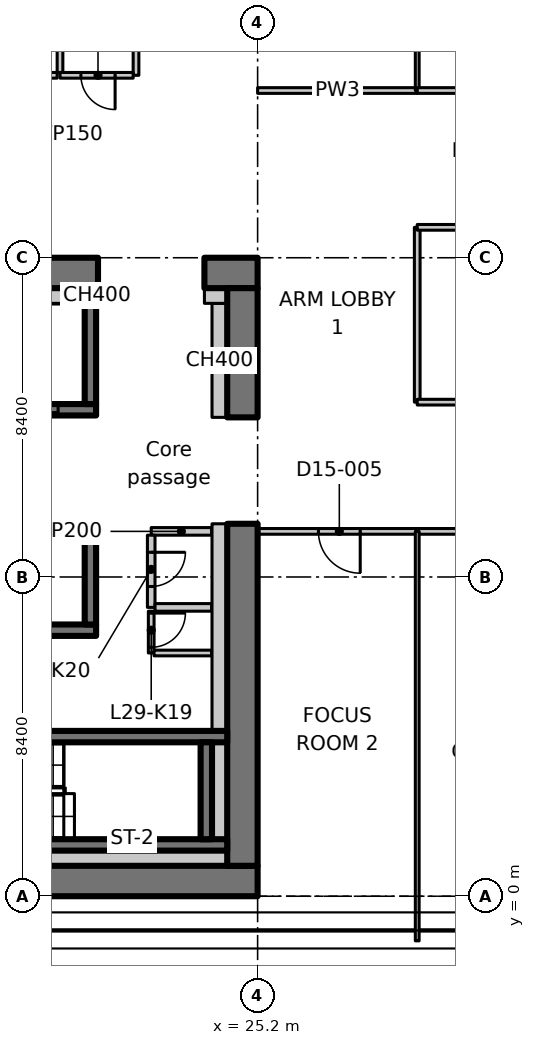
"""IFC4 building model, lengths in metres.
Left out: names, types, materials, properties, quantities, classifications, styles, units other than length and angle.
Written with IfcOpenShell. Run it as: python <this file> out.ifc"""

import sys

from ifc_helpers import new_model, si_unit, direction, frame, frame_2d, origin, place, context, subcontext, project, spatial, polyline, rectangle, outline, extrude, element, fill, save


model = new_model("IFC4")
c1 = context("Model", 3, precision=1e-05, world=origin(), true_north=direction((0.0, 1.0)))
c2 = subcontext(c1, "Body", "Model", "MODEL_VIEW")
j1 = project(units=[si_unit("LENGTHUNIT", "METRE"), si_unit("PLANEANGLEUNIT", "RADIAN")], contexts=[c1])
p1 = place(None, origin())
s1 = spatial("IfcSite", under=j1, at=p1, CompositionType="ELEMENT")
p2 = place(p1, origin())
s2 = spatial("IfcBuilding", under=s1, at=p2, CompositionType="ELEMENT")
p3 = place(p2, frame((0.0, 0.0, 120.5)))
s3 = spatial("IfcBuildingStorey", under=s2, at=p3, CompositionType="ELEMENT", Elevation=120.5)
p4 = place(p3, frame((7.136, 0.4, 0.0), z_axis=(0.0, 0.0, 1.0), x_axis=(1.0, 0.0, 0.0)))
e1 = element("IfcWall", 1, at=p4, inside=s3, PredefinedType="SHEAR", context=c2, shape_type="SweptSolid", body=[
    extrude(rectangle(XDim=18.063, YDim=0.8, at=frame_2d((9.032, 0.0))), origin(), (0.0, 0.0, 1.0), 3.35),
])
p5 = place(p3, frame((-1.1, 16.4, 0.0), z_axis=(0.0, 0.0, 1.0), x_axis=(1.0, 0.0, 0.0)))
e2 = element("IfcWall", 2, at=p5, inside=s3, PredefinedType="SHEAR", context=c2, shape_type="SweptSolid", body=[
    extrude(rectangle(XDim=22.1, YDim=0.8, at=frame_2d((11.05, 0.0))), origin(), (0.0, 0.0, 1.0), 3.35),
])
p6 = place(p5, frame((3.15, 0.0, 0.0)))
e3 = element("IfcOpeningElement", 3, at=p6, cuts=e2, PredefinedType="OPENING", context=c2, shape_type="SweptSolid", body=[
    extrude(rectangle(XDim=1.1, YDim=2.3, at=frame_2d((0.55, 1.15))), frame((0.0, 0.41, 0.0), z_axis=(0.0, -1.0, 0.0), x_axis=(1.0, 0.0, 0.0)), (0.0, 0.0, 1.0), 0.82),
])
p7 = place(p3, frame((23.8, 16.4, 0.0), z_axis=(0.0, 0.0, 1.0), x_axis=(1.0, 0.0, 0.0)))
e4 = element("IfcWall", 4, at=p7, inside=s3, PredefinedType="SHEAR", context=c2, shape_type="SweptSolid", body=[
    extrude(rectangle(XDim=1.4, YDim=0.8, at=frame_2d((0.7, 0.0))), origin(), (0.0, 0.0, 1.0), 3.35),
])
p8 = place(p3, frame((24.8, 0.8, 0.0), z_axis=(0.0, 0.0, 1.0), x_axis=(0.0, 1.0, 0.0)))
e5 = element("IfcWall", 5, at=p8, inside=s3, PredefinedType="SHEAR", context=c2, shape_type="SweptSolid", body=[
    extrude(rectangle(XDim=9.0, YDim=0.8, at=frame_2d((4.5, 0.0))), origin(), (0.0, 0.0, 1.0), 3.35),
])
p9 = place(p3, frame((24.8, 12.6, 0.0), z_axis=(0.0, 0.0, 1.0), x_axis=(0.0, 1.0, 0.0)))
e6 = element("IfcWall", 6, at=p9, inside=s3, PredefinedType="SHEAR", context=c2, shape_type="SweptSolid", body=[
    extrude(rectangle(XDim=3.4, YDim=0.8, at=frame_2d((1.7, 0.0))), origin(), (0.0, 0.0, 1.0), 3.35),
])
p10 = place(p3, frame((24.2, 12.6, 0.0), z_axis=(0.0, 0.0, 1.0), x_axis=(0.0, 1.0, 0.0)))
e7 = element("IfcWall", 7, at=p10, inside=s3, PredefinedType="PARTITIONING", context=c2, shape_type="SweptSolid", body=[
    extrude(rectangle(XDim=3.0, YDim=0.4, at=frame_2d((1.5, 0.0))), origin(), (0.0, 0.0, 1.0), 3.35),
])
p11 = place(p3, frame((23.8, 15.8, 0.0), z_axis=(0.0, 0.0, 1.0), x_axis=(1.0, 0.0, 0.0)))
e8 = element("IfcWall", 8, at=p11, inside=s3, PredefinedType="PARTITIONING", context=c2, shape_type="SweptSolid", body=[
    extrude(rectangle(XDim=0.6, YDim=0.4, at=frame_2d((0.3, 0.0))), origin(), (0.0, 0.0, 1.0), 3.35),
])
p12 = place(p3, frame((0.8, 7.0, 0.0), z_axis=(0.0, 0.0, 1.0), x_axis=(1.0, 0.0, 0.0)))
e9 = element("IfcWall", 9, at=p12, inside=s3, PredefinedType="SHEAR", context=c2, shape_type="SweptSolid", body=[
    extrude(rectangle(XDim=20.15, YDim=0.3, at=frame_2d((10.075, 0.0))), origin(), (0.0, 0.0, 1.0), 3.35),
])
p13 = place(p3, frame((0.8, 9.6, 0.0), z_axis=(0.0, 0.0, 1.0), x_axis=(1.0, 0.0, 0.0)))
e10 = element("IfcWall", 10, at=p13, inside=s3, PredefinedType="SHEAR", context=c2, shape_type="SweptSolid", body=[
    extrude(rectangle(XDim=20.15, YDim=0.3, at=frame_2d((10.075, 0.0))), origin(), (0.0, 0.0, 1.0), 3.35),
])
p14 = place(p13, frame((1.25, 0.0, 0.0)))
e11 = element("IfcOpeningElement", 11, at=p14, cuts=e10, PredefinedType="OPENING", context=c2, shape_type="SweptSolid", body=[
    extrude(rectangle(XDim=1.1, YDim=2.3, at=frame_2d((0.55, 1.15))), frame((0.0, 0.16, 0.0), z_axis=(0.0, -1.0, 0.0), x_axis=(1.0, 0.0, 0.0)), (0.0, 0.0, 1.0), 0.32),
])
p15 = place(p13, frame((4.05, 0.0, 0.0)))
e12 = element("IfcOpeningElement", 12, at=p15, cuts=e10, PredefinedType="OPENING", context=c2, shape_type="SweptSolid", body=[
    extrude(rectangle(XDim=1.1, YDim=2.3, at=frame_2d((0.55, 1.15))), frame((0.0, 0.16, 0.0), z_axis=(0.0, -1.0, 0.0), x_axis=(1.0, 0.0, 0.0)), (0.0, 0.0, 1.0), 0.32),
])
p16 = place(p13, frame((6.85, 0.0, 0.0)))
e13 = element("IfcOpeningElement", 13, at=p16, cuts=e10, PredefinedType="OPENING", context=c2, shape_type="SweptSolid", body=[
    extrude(rectangle(XDim=1.1, YDim=2.3, at=frame_2d((0.55, 1.15))), frame((0.0, 0.16, 0.0), z_axis=(0.0, -1.0, 0.0), x_axis=(1.0, 0.0, 0.0)), (0.0, 0.0, 1.0), 0.32),
])
p17 = place(p13, frame((9.65, 0.0, 0.0)))
e14 = element("IfcOpeningElement", 14, at=p17, cuts=e10, PredefinedType="OPENING", context=c2, shape_type="SweptSolid", body=[
    extrude(rectangle(XDim=1.1, YDim=2.3, at=frame_2d((0.55, 1.15))), frame((0.0, 0.16, 0.0), z_axis=(0.0, -1.0, 0.0), x_axis=(1.0, 0.0, 0.0)), (0.0, 0.0, 1.0), 0.32),
])
p18 = place(p13, frame((12.45, 0.0, 0.0)))
e15 = element("IfcOpeningElement", 15, at=p18, cuts=e10, PredefinedType="OPENING", context=c2, shape_type="SweptSolid", body=[
    extrude(rectangle(XDim=1.1, YDim=2.3, at=frame_2d((0.55, 1.15))), frame((0.0, 0.16, 0.0), z_axis=(0.0, -1.0, 0.0), x_axis=(1.0, 0.0, 0.0)), (0.0, 0.0, 1.0), 0.32),
])
p19 = place(p13, frame((15.25, 0.0, 0.0)))
e16 = element("IfcOpeningElement", 16, at=p19, cuts=e10, PredefinedType="OPENING", context=c2, shape_type="SweptSolid", body=[
    extrude(rectangle(XDim=1.1, YDim=2.3, at=frame_2d((0.55, 1.15))), frame((0.0, 0.16, 0.0), z_axis=(0.0, -1.0, 0.0), x_axis=(1.0, 0.0, 0.0)), (0.0, 0.0, 1.0), 0.32),
])
p20 = place(p3, frame((20.8, 7.15, 0.0), z_axis=(0.0, 0.0, 1.0), x_axis=(0.0, 1.0, 0.0)))
e17 = element("IfcWall", 17, at=p20, inside=s3, PredefinedType="SHEAR", context=c2, shape_type="SweptSolid", body=[
    extrude(rectangle(XDim=2.3, YDim=0.3, at=frame_2d((1.15, 0.0))), origin(), (0.0, 0.0, 1.0), 3.35),
])
p21 = place(p3, frame((15.05, 12.8, 0.0), z_axis=(0.0, 0.0, 1.0), x_axis=(1.0, 0.0, 0.0)))
e18 = element("IfcWall", 18, at=p21, inside=s3, PredefinedType="SHEAR", context=c2, shape_type="SweptSolid", body=[
    extrude(rectangle(XDim=5.9, YDim=0.3, at=frame_2d((2.95, 0.0))), origin(), (0.0, 0.0, 1.0), 3.35),
])
p22 = place(p21, frame((3.8, 0.0, 0.0)))
e19 = element("IfcOpeningElement", 19, at=p22, cuts=e18, PredefinedType="OPENING", context=c2, shape_type="SweptSolid", body=[
    extrude(rectangle(XDim=1.1, YDim=2.3, at=frame_2d((0.55, 1.15))), frame((0.0, 0.16, 0.0), z_axis=(0.0, -1.0, 0.0), x_axis=(1.0, 0.0, 0.0)), (0.0, 0.0, 1.0), 0.32),
])
p23 = place(p3, frame((20.8, 12.95, 0.0), z_axis=(0.0, 0.0, 1.0), x_axis=(0.0, 1.0, 0.0)))
e20 = element("IfcWall", 20, at=p23, inside=s3, PredefinedType="SHEAR", context=c2, shape_type="SweptSolid", body=[
    extrude(rectangle(XDim=3.05, YDim=0.3, at=frame_2d((1.525, 0.0))), origin(), (0.0, 0.0, 1.0), 3.35),
])
p24 = place(p3, frame((15.8, 1.35, 0.0), z_axis=(0.0, 0.0, 1.0), x_axis=(1.0, 0.0, 0.0)))
e21 = element("IfcWall", 21, at=p24, inside=s3, PredefinedType="SHEAR", context=c2, shape_type="SweptSolid", body=[
    extrude(rectangle(XDim=8.6, YDim=0.3, at=frame_2d((4.3, 0.0))), origin(), (0.0, 0.0, 1.0), 3.35),
])
p25 = place(p3, frame((15.8, 4.2, 0.0), z_axis=(0.0, 0.0, 1.0), x_axis=(1.0, 0.0, 0.0)))
e22 = element("IfcWall", 22, at=p25, inside=s3, PredefinedType="SHEAR", context=c2, shape_type="SweptSolid", body=[
    extrude(rectangle(XDim=8.6, YDim=0.3, at=frame_2d((4.3, 0.0))), origin(), (0.0, 0.0, 1.0), 3.35),
])
p26 = place(p25, frame((0.4, 0.0, 0.0)))
e23 = element("IfcOpeningElement", 23, at=p26, cuts=e22, PredefinedType="OPENING", context=c2, shape_type="SweptSolid", body=[
    extrude(rectangle(XDim=1.0, YDim=2.1, at=frame_2d((0.5, 1.05))), frame((0.0, 0.16, 0.0), z_axis=(0.0, -1.0, 0.0), x_axis=(1.0, 0.0, 0.0)), (0.0, 0.0, 1.0), 0.32),
])
p27 = place(p3, frame((23.85, 1.5, 0.0), z_axis=(0.0, 0.0, 1.0), x_axis=(0.0, 1.0, 0.0)))
e24 = element("IfcWall", 24, at=p27, inside=s3, PredefinedType="SHEAR", context=c2, shape_type="SweptSolid", body=[
    extrude(rectangle(XDim=2.55, YDim=0.3, at=frame_2d((1.275, 0.0))), origin(), (0.0, 0.0, 1.0), 3.35),
])
p28 = place(p3, frame((23.988, 9.6, 0.0), z_axis=(0.0, 0.0, 1.0), x_axis=(-1.0, 0.0, 0.0)))
e25 = element("IfcWall", 25, at=p28, inside=s3, PredefinedType="PARTITIONING", context=c2, shape_type="SweptSolid", body=[
    extrude(rectangle(XDim=1.588, YDim=0.2, at=frame_2d((0.794, 0.0))), origin(), (0.0, 0.0, 1.0), 3.35),
])
p29 = place(p3, frame((22.4, 9.5, 0.0), z_axis=(0.0, 0.0, 1.0), x_axis=(0.0, -1.0, 0.0)))
e26 = element("IfcWall", 26, at=p29, inside=s3, PredefinedType="PARTITIONING", context=c2, shape_type="SweptSolid", body=[
    extrude(rectangle(XDim=1.9, YDim=0.2, at=frame_2d((0.95, 0.0))), origin(), (0.0, 0.0, 1.0), 3.35),
])
p30 = place(p29, frame((0.45, 0.0, 0.0)))
e27 = element("IfcOpeningElement", 27, at=p30, cuts=e26, PredefinedType="OPENING", context=c2, shape_type="SweptSolid", body=[
    extrude(rectangle(XDim=0.9, YDim=2.1, at=frame_2d((0.45, 1.05))), frame((0.0, 0.11, 0.0), z_axis=(0.0, -1.0, 0.0), x_axis=(1.0, 0.0, 0.0)), (0.0, 0.0, 1.0), 0.22),
])
p31 = place(p3, frame((22.5, 7.6, 0.0), z_axis=(0.0, 0.0, 1.0), x_axis=(1.0, 0.0, 0.0)))
e28 = element("IfcWall", 28, at=p31, inside=s3, PredefinedType="PARTITIONING", context=c2, shape_type="SweptSolid", body=[
    extrude(rectangle(XDim=1.488, YDim=0.2, at=frame_2d((0.744, 0.0))), origin(), (0.0, 0.0, 1.0), 3.35),
])
p32 = place(p3, frame((22.0, 23.925, 0.0), z_axis=(0.0, 0.0, 1.0), x_axis=(0.0, -1.0, 0.0)))
e29 = element("IfcWall", 29, at=p32, inside=s3, PredefinedType="PARTITIONING", context=c2, shape_type="SweptSolid", body=[
    extrude(rectangle(XDim=2.325, YDim=0.15, at=frame_2d((1.163, 0.0))), origin(), (0.0, 0.0, 1.0), 3.35),
])
p33 = place(p3, frame((21.925, 21.6, 0.0), z_axis=(0.0, 0.0, 1.0), x_axis=(-1.0, 0.0, 0.0)))
e30 = element("IfcWall", 30, at=p33, inside=s3, PredefinedType="PARTITIONING", context=c2, shape_type="SweptSolid", body=[
    extrude(rectangle(XDim=1.925, YDim=0.15, at=frame_2d((0.962, 0.0))), origin(), (0.0, 0.0, 1.0), 3.35),
])
p34 = place(p33, frame((0.475, 0.0, 0.0)))
e31 = element("IfcOpeningElement", 31, at=p34, cuts=e30, PredefinedType="OPENING", context=c2, shape_type="SweptSolid", body=[
    extrude(rectangle(XDim=0.9, YDim=2.1, at=frame_2d((0.45, 1.05))), frame((0.0, 0.085, 0.0), z_axis=(0.0, -1.0, 0.0), x_axis=(1.0, 0.0, 0.0)), (0.0, 0.0, 1.0), 0.17),
])
p35 = place(p3, frame((20.0, 21.675, 0.0), z_axis=(0.0, 0.0, 1.0), x_axis=(0.0, 1.0, 0.0)))
e32 = element("IfcWall", 32, at=p35, inside=s3, PredefinedType="PARTITIONING", context=c2, shape_type="SweptSolid", body=[
    extrude(rectangle(XDim=2.25, YDim=0.15, at=frame_2d((1.125, 0.0))), origin(), (0.0, 0.0, 1.0), 3.35),
])
p36 = place(p3, frame((19.925, 21.6, 0.0), z_axis=(0.0, 0.0, 1.0), x_axis=(-1.0, 0.0, 0.0)))
e33 = element("IfcWall", 33, at=p36, inside=s3, PredefinedType="PARTITIONING", context=c2, shape_type="SweptSolid", body=[
    extrude(rectangle(XDim=2.325, YDim=0.15, at=frame_2d((1.163, 0.0))), origin(), (0.0, 0.0, 1.0), 3.35),
])
p37 = place(p36, frame((0.675, 0.0, 0.0)))
e34 = element("IfcOpeningElement", 34, at=p37, cuts=e33, PredefinedType="OPENING", context=c2, shape_type="SweptSolid", body=[
    extrude(rectangle(XDim=0.9, YDim=2.1, at=frame_2d((0.45, 1.05))), frame((0.0, 0.085, 0.0), z_axis=(0.0, -1.0, 0.0), x_axis=(1.0, 0.0, 0.0)), (0.0, 0.0, 1.0), 0.17),
])
p38 = place(p3, frame((22.4, 7.5, 0.0), z_axis=(0.0, 0.0, 1.0), x_axis=(0.0, -1.0, 0.0)))
e35 = element("IfcWall", 35, at=p38, inside=s3, PredefinedType="PARTITIONING", context=c2, shape_type="SweptSolid", body=[
    extrude(rectangle(XDim=1.1, YDim=0.15, at=frame_2d((0.55, 0.0))), origin(), (0.0, 0.0, 1.0), 3.35),
])
p39 = place(p38, frame((0.05, 0.0, 0.0)))
e36 = element("IfcOpeningElement", 36, at=p39, cuts=e35, PredefinedType="OPENING", context=c2, shape_type="SweptSolid", body=[
    extrude(rectangle(XDim=0.9, YDim=2.1, at=frame_2d((0.45, 1.05))), frame((0.0, 0.085, 0.0), z_axis=(0.0, -1.0, 0.0), x_axis=(1.0, 0.0, 0.0)), (0.0, 0.0, 1.0), 0.17),
])
p40 = place(p3, frame((22.475, 6.4, 0.0), z_axis=(0.0, 0.0, 1.0), x_axis=(1.0, 0.0, 0.0)))
e37 = element("IfcWall", 37, at=p40, inside=s3, PredefinedType="PARTITIONING", context=c2, shape_type="SweptSolid", body=[
    extrude(rectangle(XDim=1.513, YDim=0.15, at=frame_2d((0.756, 0.0))), origin(), (0.0, 0.0, 1.0), 3.35),
])
p41 = place(p3, frame((18.15, 15.8, 0.0), z_axis=(0.0, 0.0, 1.0), x_axis=(1.0, 0.0, 0.0)))
e38 = element("IfcWall", 38, at=p41, inside=s3, PredefinedType="PARTITIONING", context=c2, shape_type="SweptSolid", body=[
    extrude(rectangle(XDim=2.5, YDim=0.4, at=frame_2d((1.25, 0.0))), origin(), (0.0, 0.0, 1.0), 3.35),
])
p42 = place(p3, frame((20.95, 15.8, 0.0), z_axis=(0.0, 0.0, 1.0), x_axis=(1.0, 0.0, 0.0)))
e39 = element("IfcWall", 39, at=p42, inside=s3, PredefinedType="PARTITIONING", context=c2, shape_type="SweptSolid", body=[
    extrude(rectangle(XDim=0.05, YDim=0.4, at=frame_2d((0.025, 0.0))), origin(), (0.0, 0.0, 1.0), 3.35),
])
p43 = place(p3, frame((13.35, 1.0, 0.0), z_axis=(0.0, 0.0, 1.0), x_axis=(1.0, 0.0, 0.0)))
e40 = element("IfcWall", 40, at=p43, inside=s3, PredefinedType="PARTITIONING", context=c2, shape_type="SweptSolid", body=[
    extrude(rectangle(XDim=11.05, YDim=0.4, at=frame_2d((5.525, 0.0))), origin(), (0.0, 0.0, 1.0), 3.35),
])
p44 = place(p3, frame((24.2, 1.5, 0.0), z_axis=(0.0, 0.0, 1.0), x_axis=(0.0, 1.0, 0.0)))
e41 = element("IfcWall", 41, at=p44, inside=s3, PredefinedType="PARTITIONING", context=c2, shape_type="SweptSolid", body=[
    extrude(rectangle(XDim=2.55, YDim=0.4, at=frame_2d((1.275, 0.0))), origin(), (0.0, 0.0, 1.0), 3.35),
])
p45 = place(p3, frame((24.2, 4.35, 0.0), z_axis=(0.0, 0.0, 1.0), x_axis=(0.0, 1.0, 0.0)))
e42 = element("IfcWall", 42, at=p45, inside=s3, PredefinedType="PARTITIONING", context=c2, shape_type="SweptSolid", body=[
    extrude(rectangle(XDim=5.45, YDim=0.4, at=frame_2d((2.725, 0.0))), origin(), (0.0, 0.0, 1.0), 3.35),
])
p46 = place(p3, frame((25.2, 21.2, 0.0), z_axis=(0.0, 0.0, 1.0), x_axis=(1.0, 0.0, 0.0)))
e43 = element("IfcWall", 43, at=p46, inside=s3, PredefinedType="PARTITIONING", context=c2, shape_type="SweptSolid", body=[
    extrude(rectangle(XDim=4.2, YDim=0.15, at=frame_2d((2.1, 0.0))), origin(), (0.0, 0.0, 1.0), 3.33),
])
p47 = place(p3, frame((29.4, 17.6, 0.0), z_axis=(0.0, 0.0, 1.0), x_axis=(0.0, -1.0, 0.0)))
e44 = element("IfcWall", 44, at=p47, inside=s3, PredefinedType="PARTITIONING", context=c2, shape_type="SweptSolid", body=[
    extrude(rectangle(XDim=4.6, YDim=0.15, at=frame_2d((2.3, 0.0))), origin(), (0.0, 0.0, 1.0), 3.33),
])
p48 = place(p3, frame((29.4, 9.6, 0.0), z_axis=(0.0, 0.0, 1.0), x_axis=(-1.0, 0.0, 0.0)))
e45 = element("IfcWall", 45, at=p48, inside=s3, PredefinedType="PARTITIONING", context=c2, shape_type="SweptSolid", body=[
    extrude(rectangle(XDim=4.2, YDim=0.15, at=frame_2d((2.1, 0.0))), origin(), (0.0, 0.0, 1.0), 3.33),
])
p49 = place(p48, frame((1.5, 0.0, 0.0)))
e46 = element("IfcOpeningElement", 46, at=p49, cuts=e45, PredefinedType="OPENING", context=c2, shape_type="SweptSolid", body=[
    extrude(rectangle(XDim=1.1, YDim=2.1, at=frame_2d((0.55, 1.05))), frame((0.0, 0.085, 0.0), z_axis=(0.0, -1.0, 0.0), x_axis=(1.0, 0.0, 0.0)), (0.0, 0.0, 1.0), 0.17),
])
p50 = place(p3, frame((29.4, 27.511, 0.0), z_axis=(0.0, 0.0, 1.0), x_axis=(0.0, -1.0, 0.0)))
e47 = element("IfcWall", 47, at=p50, inside=s3, PredefinedType="PARTITIONING", context=c2, shape_type="SweptSolid", body=[
    extrude(outline(polyline([(0.0, 0.0), (6.311, 0.0), (6.311, 3.33), (2.761, 3.33), (2.759, 2.98), (1.863, 2.98), (1.861, 3.33), (0.236, 3.33), (0.0, 3.33), (0.0, 0.0)])), frame((0.0, 0.05, 0.0), z_axis=(0.0, -1.0, 0.0), x_axis=(1.0, 0.0, 0.0)), (0.0, 0.0, 1.0), 0.1),
])
p51 = place(p3, frame((29.4, 13.0, 0.0), z_axis=(0.0, 0.0, 1.0), x_axis=(1.0, 0.0, 0.0)))
e48 = element("IfcWall", 48, at=p51, inside=s3, PredefinedType="PARTITIONING", context=c2, shape_type="SweptSolid", body=[
    extrude(rectangle(XDim=11.8, YDim=0.15, at=frame_2d((5.9, 0.0))), origin(), (0.0, 0.0, 1.0), 3.33),
])
p52 = place(p3, frame((33.6, 9.6, 0.0), z_axis=(0.0, 0.0, 1.0), x_axis=(-1.0, 0.0, 0.0)))
e49 = element("IfcWall", 49, at=p52, inside=s3, PredefinedType="PARTITIONING", context=c2, shape_type="SweptSolid", body=[
    extrude(rectangle(XDim=4.2, YDim=0.15, at=frame_2d((2.1, 0.0))), origin(), (0.0, 0.0, 1.0), 3.33),
])
p53 = place(p52, frame((1.5, 0.0, 0.0)))
e50 = element("IfcOpeningElement", 50, at=p53, cuts=e49, PredefinedType="OPENING", context=c2, shape_type="SweptSolid", body=[
    extrude(rectangle(XDim=1.1, YDim=2.1, at=frame_2d((0.55, 1.05))), frame((0.0, 0.085, 0.0), z_axis=(0.0, -1.0, 0.0), x_axis=(1.0, 0.0, 0.0)), (0.0, 0.0, 1.0), 0.17),
])
p54 = place(p3, frame((41.2, 17.6, 0.0), z_axis=(0.0, 0.0, 1.0), x_axis=(-1.0, 0.0, 0.0)))
e51 = element("IfcWall", 51, at=p54, inside=s3, PredefinedType="PARTITIONING", context=c2, shape_type="SweptSolid", body=[
    extrude(rectangle(XDim=11.8, YDim=0.15, at=frame_2d((5.9, 0.0))), origin(), (0.0, 0.0, 1.0), 3.33),
])
p55 = place(p54, frame((5.4, 0.0, 0.0)))
e52 = element("IfcOpeningElement", 52, at=p55, cuts=e51, PredefinedType="OPENING", context=c2, shape_type="SweptSolid", body=[
    extrude(rectangle(XDim=1.1, YDim=2.1, at=frame_2d((0.55, 1.05))), frame((0.0, 0.085, 0.0), z_axis=(0.0, -1.0, 0.0), x_axis=(1.0, 0.0, 0.0)), (0.0, 0.0, 1.0), 0.17),
])
p56 = place(p3, frame((29.4, 21.2, 0.0), z_axis=(0.0, 0.0, 1.0), x_axis=(1.0, 0.0, 0.0)))
e53 = element("IfcWall", 53, at=p56, inside=s3, PredefinedType="PARTITIONING", context=c2, shape_type="SweptSolid", body=[
    extrude(rectangle(XDim=4.2, YDim=0.15, at=frame_2d((2.1, 0.0))), origin(), (0.0, 0.0, 1.0), 3.33),
])
p57 = place(p56, frame((1.5, 0.0, 0.0)))
e54 = element("IfcOpeningElement", 54, at=p57, cuts=e53, PredefinedType="OPENING", context=c2, shape_type="SweptSolid", body=[
    extrude(rectangle(XDim=1.1, YDim=2.1, at=frame_2d((0.55, 1.05))), frame((0.0, 0.085, 0.0), z_axis=(0.0, -1.0, 0.0), x_axis=(1.0, 0.0, 0.0)), (0.0, 0.0, 1.0), 0.17),
])
p58 = place(p3, frame((29.4, 9.6, 0.0), z_axis=(0.0, 0.0, 1.0), x_axis=(0.0, -1.0, 0.0)))
e55 = element("IfcWall", 55, at=p58, inside=s3, PredefinedType="PARTITIONING", context=c2, shape_type="SweptSolid", body=[
    extrude(outline(polyline([(0.0, 0.0), (10.774, 0.0), (10.774, 3.33), (10.7, 3.33), (10.05, 3.33), (10.048, 2.98), (9.152, 2.98), (9.15, 3.33), (0.0, 3.33), (0.0, 0.0)])), frame((0.0, 0.05, 0.0), z_axis=(0.0, -1.0, 0.0), x_axis=(1.0, 0.0, 0.0)), (0.0, 0.0, 1.0), 0.1),
])
p59 = place(p22, origin())
e56 = element("IfcDoor", 56, at=p59, inside=s3, OperationType="SLIDING_TO_LEFT", PredefinedType="DOOR", context=c2, shape_type="SweptSolid", body=[
    extrude(rectangle(XDim=1.1, YDim=2.3, at=frame_2d((0.55, 1.15))), frame((0.0, 0.025, 0.0), z_axis=(0.0, -1.0, 0.0), x_axis=(1.0, 0.0, 0.0)), (0.0, 0.0, 1.0), 0.05),
])
fill(e19, e56)
p60 = place(p39, origin())
e57 = element("IfcDoor", 57, at=p60, inside=s3, OperationType="SINGLE_SWING_RIGHT", PredefinedType="DOOR", context=c2, shape_type="SweptSolid", body=[
    extrude(rectangle(XDim=0.9, YDim=2.1, at=frame_2d((0.45, 1.05))), frame((0.0, 0.025, 0.0), z_axis=(0.0, -1.0, 0.0), x_axis=(1.0, 0.0, 0.0)), (0.0, 0.0, 1.0), 0.05),
])
fill(e36, e57)
p61 = place(p30, origin())
e58 = element("IfcDoor", 58, at=p61, inside=s3, OperationType="SINGLE_SWING_LEFT", PredefinedType="DOOR", context=c2, shape_type="SweptSolid", body=[
    extrude(rectangle(XDim=0.9, YDim=2.1, at=frame_2d((0.45, 1.05))), frame((0.0, 0.025, 0.0), z_axis=(0.0, -1.0, 0.0), x_axis=(1.0, 0.0, 0.0)), (0.0, 0.0, 1.0), 0.05),
])
fill(e27, e58)
p62 = place(p34, origin())
e59 = element("IfcDoor", 59, at=p62, inside=s3, OperationType="SINGLE_SWING_LEFT", PredefinedType="DOOR", context=c2, shape_type="SweptSolid", body=[
    extrude(rectangle(XDim=0.9, YDim=2.1, at=frame_2d((0.45, 1.05))), frame((0.0, 0.025, 0.0), z_axis=(0.0, -1.0, 0.0), x_axis=(1.0, 0.0, 0.0)), (0.0, 0.0, 1.0), 0.05),
])
fill(e31, e59)
p63 = place(p49, origin())
e60 = element("IfcDoor", 60, at=p63, inside=s3, OperationType="SINGLE_SWING_LEFT", PredefinedType="DOOR", context=c2, shape_type="SweptSolid", body=[
    extrude(rectangle(XDim=1.1, YDim=2.1, at=frame_2d((0.55, 1.05))), frame((0.0, 0.025, 0.0), z_axis=(0.0, -1.0, 0.0), x_axis=(1.0, 0.0, 0.0)), (0.0, 0.0, 1.0), 0.05),
])
fill(e46, e60)
save(model, sys.argv[1])
